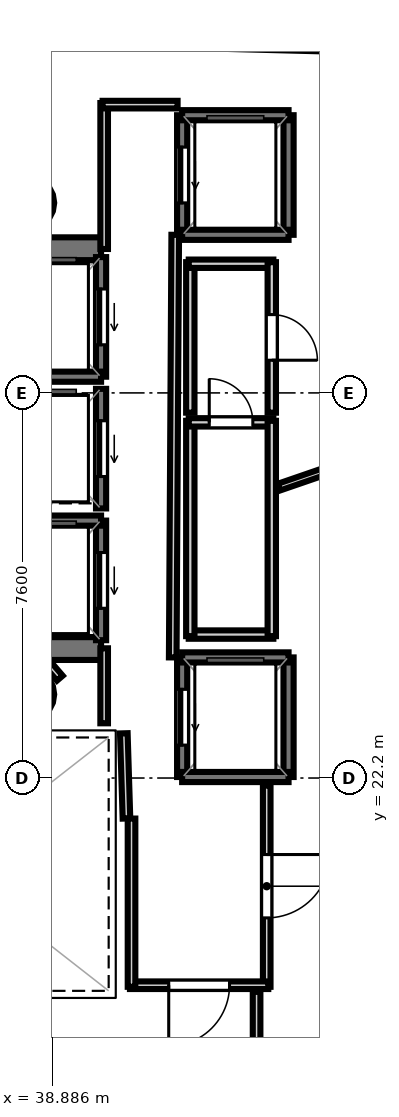
"""IFC4 building model, lengths in metres.
Left out: names, types, materials, properties, quantities, classifications, styles, units other than length and angle.
Written with IfcOpenShell. Run it as: python <this file> out.ifc"""

import sys

from ifc_helpers import new_model, si_unit, direction, frame, frame_2d, origin, origin_2d, place, context, subcontext, project, spatial, rectangle, hollow_circle, extrude, element, fill, save


model = new_model("IFC4")
c1 = context("Model", 3, precision=1e-05, world=origin(), true_north=direction((0.0, 1.0)))
c2 = subcontext(c1, "Body", "Model", "MODEL_VIEW")
j1 = project(units=[si_unit("LENGTHUNIT", "METRE"), si_unit("PLANEANGLEUNIT", "RADIAN")], contexts=[c1])
p1 = place(None, origin())
s1 = spatial("IfcSite", under=j1, at=p1, CompositionType="ELEMENT")
p2 = place(p1, origin())
s2 = spatial("IfcBuilding", under=s1, at=p2, CompositionType="ELEMENT")
p3 = place(p2, frame((0.0, 0.0, 246.4)))
s3 = spatial("IfcBuildingStorey", under=s2, at=p3, CompositionType="ELEMENT", Elevation=246.4)
p4 = place(p3, frame((29.33, 32.645, 0.0), z_axis=(0.0, 0.0, 1.0), x_axis=(1.0, 0.0, 0.0)))
e1 = element("IfcWall", 1, at=p4, inside=s3, PredefinedType="SHEAR", context=c2, shape_type="SweptSolid", body=[
    extrude(rectangle(XDim=10.52, YDim=0.45, at=frame_2d((5.26, 0.0))), origin(), (0.0, 0.0, 1.0), 3.52),
])
p5 = place(p4, frame((0.895, 0.0, 0.0)))
e2 = element("IfcOpeningElement", 2, at=p5, cuts=e1, PredefinedType="OPENING", context=c2, shape_type="SweptSolid", body=[
    extrude(rectangle(XDim=1.25, YDim=2.15, at=frame_2d((0.625, 1.075))), frame((0.0, 0.235, 0.0), z_axis=(0.0, -1.0, 0.0), x_axis=(1.0, 0.0, 0.0)), (0.0, 0.0, 1.0), 0.47),
])
p6 = place(p3, frame((29.33, 24.755, 0.0), z_axis=(0.0, 0.0, 1.0), x_axis=(1.0, 0.0, 0.0)))
e3 = element("IfcWall", 3, at=p6, inside=s3, PredefinedType="SHEAR", context=c2, shape_type="SweptSolid", body=[
    extrude(rectangle(XDim=10.52, YDim=0.45, at=frame_2d((5.26, 0.0))), origin(), (0.0, 0.0, 1.0), 3.52),
])
p7 = place(p6, frame((0.695, 0.0, 0.0)))
e4 = element("IfcOpeningElement", 4, at=p7, cuts=e3, PredefinedType="OPENING", context=c2, shape_type="SweptSolid", body=[
    extrude(rectangle(XDim=1.25, YDim=2.15, at=frame_2d((0.625, 1.075))), frame((0.0, 0.235, 0.0), z_axis=(0.0, -1.0, 0.0), x_axis=(1.0, 0.0, 0.0)), (0.0, 0.0, 1.0), 0.47),
])
for number, where, z_axis, x_axis in (
    (5, (38.4, 33.55, 0.0), (0.0, 0.0, 1.0), (1.0, 0.0, 0.0)),
    (6, (38.4, 23.85, 0.0), (0.0, 0.0, 1.0), (1.0, 0.0, 0.0)),
):
    element("IfcColumn", number, at=place(p3, frame(where, z_axis=z_axis, x_axis=x_axis)), inside=s3, PredefinedType="COLUMN", context=c2, shape_type="SweptSolid", body=[
        extrude(hollow_circle(Radius=0.525, WallThickness=0.028, at=origin_2d()), origin(), (0.0, 0.0, 1.0), 3.7),
    ])
p8 = place(p3, frame((39.85, 30.12, 0.0), z_axis=(0.0, 0.0, 1.0), x_axis=(0.0, 1.0, 0.0)))
e7 = element("IfcWall", 7, at=p8, inside=s3, PredefinedType="SOLIDWALL", context=c2, shape_type="SweptSolid", body=[
    extrude(rectangle(XDim=2.36, YDim=0.2, at=frame_2d((1.18, 0.0))), origin(), (0.0, 0.0, 1.0), 3.52),
])
p9 = place(p8, frame((0.63, 0.0, 0.0)))
e8 = element("IfcOpeningElement", 8, at=p9, cuts=e7, PredefinedType="OPENING", context=c2, shape_type="SweptSolid", body=[
    extrude(rectangle(XDim=1.1, YDim=2.15, at=frame_2d((0.55, 1.075))), frame((0.0, 0.11, 0.0), z_axis=(0.0, -1.0, 0.0), x_axis=(1.0, 0.0, 0.0)), (0.0, 0.0, 1.0), 0.22),
])
p10 = place(p3, frame((37.75, 30.12, 0.0), z_axis=(0.0, 0.0, 1.0), x_axis=(1.0, 0.0, 0.0)))
e9 = element("IfcWall", 9, at=p10, inside=s3, PredefinedType="SOLIDWALL", context=c2, shape_type="SweptSolid", body=[
    extrude(rectangle(XDim=2.1, YDim=0.2, at=frame_2d((1.05, 0.0))), origin(), (0.0, 0.0, 1.0), 3.52),
])
p11 = place(p3, frame((39.85, 24.92, 0.0), z_axis=(0.0, 0.0, 1.0), x_axis=(0.0, 1.0, 0.0)))
e10 = element("IfcWall", 10, at=p11, inside=s3, PredefinedType="SOLIDWALL", context=c2, shape_type="SweptSolid", body=[
    extrude(rectangle(XDim=2.36, YDim=0.2, at=frame_2d((1.18, 0.0))), origin(), (0.0, 0.0, 1.0), 3.52),
])
p12 = place(p11, frame((0.63, 0.0, 0.0)))
e11 = element("IfcOpeningElement", 11, at=p12, cuts=e10, PredefinedType="OPENING", context=c2, shape_type="SweptSolid", body=[
    extrude(rectangle(XDim=1.1, YDim=2.15, at=frame_2d((0.55, 1.075))), frame((0.0, 0.11, 0.0), z_axis=(0.0, -1.0, 0.0), x_axis=(1.0, 0.0, 0.0)), (0.0, 0.0, 1.0), 0.22),
])
p13 = place(p3, frame((37.75, 27.28, 0.0), z_axis=(0.0, 0.0, 1.0), x_axis=(1.0, 0.0, 0.0)))
e12 = element("IfcWall", 12, at=p13, inside=s3, PredefinedType="SOLIDWALL", context=c2, shape_type="SweptSolid", body=[
    extrude(rectangle(XDim=2.1, YDim=0.2, at=frame_2d((1.05, 0.0))), origin(), (0.0, 0.0, 1.0), 3.52),
])
p14 = place(p3, frame((39.85, 27.52, 0.0), z_axis=(0.0, 0.0, 1.0), x_axis=(0.0, 1.0, 0.0)))
e13 = element("IfcWall", 13, at=p14, inside=s3, PredefinedType="SOLIDWALL", context=c2, shape_type="SweptSolid", body=[
    extrude(rectangle(XDim=2.36, YDim=0.2, at=frame_2d((1.18, 0.0))), origin(), (0.0, 0.0, 1.0), 3.52),
])
p15 = place(p14, frame((0.63, 0.0, 0.0)))
e14 = element("IfcOpeningElement", 14, at=p15, cuts=e13, PredefinedType="OPENING", context=c2, shape_type="SweptSolid", body=[
    extrude(rectangle(XDim=1.1, YDim=2.15, at=frame_2d((0.55, 1.075))), frame((0.0, 0.11, 0.0), z_axis=(0.0, -1.0, 0.0), x_axis=(1.0, 0.0, 0.0)), (0.0, 0.0, 1.0), 0.22),
])
p16 = place(p3, frame((43.55, 22.22, 0.0), z_axis=(0.0, 0.0, 1.0), x_axis=(0.0, 1.0, 0.0)))
e15 = element("IfcWall", 15, at=p16, inside=s3, PredefinedType="SOLIDWALL", context=c2, shape_type="SweptSolid", body=[
    extrude(rectangle(XDim=2.36, YDim=0.2, at=frame_2d((1.18, 0.0))), origin(), (0.0, 0.0, 1.0), 3.52),
])
p17 = place(p3, frame((41.45, 22.22, 0.0), z_axis=(0.0, 0.0, 1.0), x_axis=(0.0, 1.0, 0.0)))
e16 = element("IfcWall", 16, at=p17, inside=s3, PredefinedType="SOLIDWALL", context=c2, shape_type="SweptSolid", body=[
    extrude(rectangle(XDim=2.36, YDim=0.2, at=frame_2d((1.18, 0.0))), origin(), (0.0, 0.0, 1.0), 3.52),
])
p18 = place(p17, frame((0.63, 0.0, 0.0)))
e17 = element("IfcOpeningElement", 17, at=p18, cuts=e16, PredefinedType="OPENING", context=c2, shape_type="SweptSolid", body=[
    extrude(rectangle(XDim=1.1, YDim=2.15, at=frame_2d((0.55, 1.075))), frame((0.0, 0.11, 0.0), z_axis=(0.0, -1.0, 0.0), x_axis=(1.0, 0.0, 0.0)), (0.0, 0.0, 1.0), 0.22),
])
for number, where, z_axis, x_axis in (
    (18, (41.45, 24.58, 0.0), (0.0, 0.0, 1.0), (1.0, 0.0, 0.0)),
    (19, (41.45, 22.22, 0.0), (0.0, 0.0, 1.0), (1.0, 0.0, 0.0)),
):
    element("IfcWall", number, at=place(p3, frame(where, z_axis=z_axis, x_axis=x_axis)), inside=s3, PredefinedType="SOLIDWALL", context=c2, shape_type="SweptSolid", body=[
        extrude(rectangle(XDim=2.1, YDim=0.2, at=frame_2d((1.05, 0.0))), origin(), (0.0, 0.0, 1.0), 3.52),
    ])
p19 = place(p3, frame((43.55, 32.92, 0.0), z_axis=(0.0, 0.0, 1.0), x_axis=(0.0, 1.0, 0.0)))
e20 = element("IfcWall", 20, at=p19, inside=s3, PredefinedType="SOLIDWALL", context=c2, shape_type="SweptSolid", body=[
    extrude(rectangle(XDim=2.36, YDim=0.2, at=frame_2d((1.18, 0.0))), origin(), (0.0, 0.0, 1.0), 3.52),
])
p20 = place(p3, frame((41.45, 32.92, 0.0), z_axis=(0.0, 0.0, 1.0), x_axis=(0.0, 1.0, 0.0)))
e21 = element("IfcWall", 21, at=p20, inside=s3, PredefinedType="SOLIDWALL", context=c2, shape_type="SweptSolid", body=[
    extrude(rectangle(XDim=2.36, YDim=0.2, at=frame_2d((1.18, 0.0))), origin(), (0.0, 0.0, 1.0), 3.52),
])
p21 = place(p20, frame((0.63, 0.0, 0.0)))
e22 = element("IfcOpeningElement", 22, at=p21, cuts=e21, PredefinedType="OPENING", context=c2, shape_type="SweptSolid", body=[
    extrude(rectangle(XDim=1.1, YDim=2.15, at=frame_2d((0.55, 1.075))), frame((0.0, 0.11, 0.0), z_axis=(0.0, -1.0, 0.0), x_axis=(1.0, 0.0, 0.0)), (0.0, 0.0, 1.0), 0.22),
])
for number, where, z_axis, x_axis in (
    (23, (41.45, 35.28, 0.0), (0.0, 0.0, 1.0), (1.0, 0.0, 0.0)),
    (24, (41.45, 32.92, 0.0), (0.0, 0.0, 1.0), (1.0, 0.0, 0.0)),
):
    element("IfcWall", number, at=place(p3, frame(where, z_axis=z_axis, x_axis=x_axis)), inside=s3, PredefinedType="SOLIDWALL", context=c2, shape_type="SweptSolid", body=[
        extrude(rectangle(XDim=2.1, YDim=0.2, at=frame_2d((1.05, 0.0))), origin(), (0.0, 0.0, 1.0), 3.52),
    ])
p22 = place(p3, frame((40.351, 21.401, 0.0), z_axis=(0.0, 0.0, 1.0), x_axis=(-0.031058045979, 0.999517582527, 0.0)))
e25 = element("IfcWall", 25, at=p22, inside=s3, PredefinedType="PARTITIONING", context=c2, shape_type="SweptSolid", body=[
    extrude(rectangle(XDim=1.682, YDim=0.15, at=frame_2d((0.841, 0.0))), origin(), (0.0, 0.0, 1.0), 2.84),
])
p23 = place(p3, frame((39.911, 23.28, 0.0), z_axis=(0.0, 0.0, 1.0), x_axis=(0.0, 1.0, 0.0)))
e26 = element("IfcWall", 26, at=p23, inside=s3, PredefinedType="PARTITIONING", context=c2, shape_type="SweptSolid", body=[
    extrude(rectangle(XDim=1.48, YDim=0.15, at=frame_2d((0.74, 0.0))), origin(), (0.0, 0.0, 1.0), 2.84),
])
p24 = place(p3, frame((39.911, 32.64, 0.0), z_axis=(0.0, 0.0, 1.0), x_axis=(0.0, 1.0, 0.0)))
e27 = element("IfcWall", 27, at=p24, inside=s3, PredefinedType="PARTITIONING", context=c2, shape_type="SweptSolid", body=[
    extrude(rectangle(XDim=2.88, YDim=0.15, at=frame_2d((1.44, 0.0))), origin(), (0.0, 0.0, 1.0), 2.84),
])
p25 = place(p3, frame((39.88, 35.489, 0.0), z_axis=(0.0, 0.0, 1.0), x_axis=(1.0, 0.0, 0.0)))
e28 = element("IfcWall", 28, at=p25, inside=s3, PredefinedType="PARTITIONING", context=c2, shape_type="SweptSolid", body=[
    extrude(rectangle(XDim=1.48, YDim=0.15, at=frame_2d((0.74, 0.0))), origin(), (0.0, 0.0, 1.0), 2.84),
])
p26 = place(p3, frame((41.313, 32.92, 0.0), z_axis=(0.0, 0.0, 1.0), x_axis=(-0.005942518022, -0.999982343084, 0.0)))
e29 = element("IfcWall", 29, at=p26, inside=s3, PredefinedType="PARTITIONING", context=c2, shape_type="SweptSolid", body=[
    extrude(rectangle(XDim=8.34, YDim=0.15, at=frame_2d((4.17, 0.0))), origin(), (0.0, 0.0, 1.0), 2.84),
])
p27 = place(p3, frame((43.119, 22.05, 0.0), z_axis=(0.0, 0.0, 1.0), x_axis=(0.0, -1.0, 0.0)))
e30 = element("IfcWall", 30, at=p27, inside=s3, PredefinedType="PARTITIONING", context=c2, shape_type="SweptSolid", body=[
    extrude(rectangle(XDim=3.97, YDim=0.15, at=frame_2d((1.985, 0.0))), origin(), (0.0, 0.0, 1.0), 2.84),
])
p28 = place(p27, frame((1.36, 0.0, 0.0)))
e31 = element("IfcOpeningElement", 31, at=p28, cuts=e30, PredefinedType="OPENING", context=c2, shape_type="SweptSolid", body=[
    extrude(rectangle(XDim=1.25, YDim=2.2, at=frame_2d((0.625, 1.1))), frame((0.0, 0.085, 0.0), z_axis=(0.0, -1.0, 0.0), x_axis=(1.0, 0.0, 0.0)), (0.0, 0.0, 1.0), 0.17),
])
p29 = place(p3, frame((43.15, 18.111, 0.0), z_axis=(0.0, 0.0, 1.0), x_axis=(-1.0, 0.0, 0.0)))
e32 = element("IfcWall", 32, at=p29, inside=s3, PredefinedType="PARTITIONING", context=c2, shape_type="SweptSolid", body=[
    extrude(rectangle(XDim=2.73, YDim=0.15, at=frame_2d((1.365, 0.0))), origin(), (0.0, 0.0, 1.0), 2.84),
])
p30 = place(p29, frame((0.765, 0.0, 0.0)))
e33 = element("IfcOpeningElement", 33, at=p30, cuts=e32, PredefinedType="OPENING", context=c2, shape_type="SweptSolid", body=[
    extrude(rectangle(XDim=1.2, YDim=2.15, at=frame_2d((0.6, 1.075))), frame((0.0, 0.085, 0.0), z_axis=(0.0, -1.0, 0.0), x_axis=(1.0, 0.0, 0.0)), (0.0, 0.0, 1.0), 0.17),
])
p31 = place(p3, frame((40.451, 18.08, 0.0), z_axis=(0.0, 0.0, 1.0), x_axis=(0.0, 1.0, 0.0)))
e34 = element("IfcWall", 34, at=p31, inside=s3, PredefinedType="PARTITIONING", context=c2, shape_type="SweptSolid", body=[
    extrude(rectangle(XDim=3.32, YDim=0.15, at=frame_2d((1.66, 0.0))), origin(), (0.0, 0.0, 1.0), 2.84),
])
p32 = place(p3, frame((43.25, 25.031, 0.0), z_axis=(0.0, 0.0, 1.0), x_axis=(-1.0, 0.0, 0.0)))
e35 = element("IfcWall", 35, at=p32, inside=s3, PredefinedType="PLUMBINGWALL", context=c2, shape_type="SweptSolid", body=[
    extrude(rectangle(XDim=1.67, YDim=0.165, at=frame_2d((0.835, 0.0))), origin(), (0.0, 0.0, 1.0), 2.84),
])
p33 = place(p3, frame((41.611, 25.0, 0.0), z_axis=(0.0, 0.0, 1.0), x_axis=(0.0, 1.0, 0.0)))
e36 = element("IfcWall", 36, at=p33, inside=s3, PredefinedType="PLUMBINGWALL", context=c2, shape_type="SweptSolid", body=[
    extrude(rectangle(XDim=4.25, YDim=0.165, at=frame_2d((2.125, 0.0))), origin(), (0.0, 0.0, 1.0), 2.84),
])
p34 = place(p3, frame((41.58, 29.219, 0.0), z_axis=(0.0, 0.0, 1.0), x_axis=(1.0, 0.0, 0.0)))
e37 = element("IfcWall", 37, at=p34, inside=s3, PredefinedType="PLUMBINGWALL", context=c2, shape_type="SweptSolid", body=[
    extrude(rectangle(XDim=1.67, YDim=0.165, at=frame_2d((0.835, 0.0))), origin(), (0.0, 0.0, 1.0), 2.84),
])
p35 = place(p34, frame((0.405, 0.0, 0.0)))
e38 = element("IfcOpeningElement", 38, at=p35, cuts=e37, PredefinedType="OPENING", context=c2, shape_type="SweptSolid", body=[
    extrude(rectangle(XDim=0.86, YDim=2.05, at=frame_2d((0.43, 1.025))), frame((0.0, 0.093, 0.0), z_axis=(0.0, -1.0, 0.0), x_axis=(1.0, 0.0, 0.0)), (0.0, 0.0, 1.0), 0.185),
])
p36 = place(p3, frame((43.219, 29.25, 0.0), z_axis=(0.0, 0.0, 1.0), x_axis=(0.0, -1.0, 0.0)))
e39 = element("IfcWall", 39, at=p36, inside=s3, PredefinedType="PLUMBINGWALL", context=c2, shape_type="SweptSolid", body=[
    extrude(rectangle(XDim=4.25, YDim=0.165, at=frame_2d((2.125, 0.0))), origin(), (0.0, 0.0, 1.0), 2.84),
])
p37 = place(p3, frame((41.611, 29.41, 0.0), z_axis=(0.0, 0.0, 1.0), x_axis=(0.0, 1.0, 0.0)))
e40 = element("IfcWall", 40, at=p37, inside=s3, PredefinedType="PLUMBINGWALL", context=c2, shape_type="SweptSolid", body=[
    extrude(rectangle(XDim=2.97, YDim=0.165, at=frame_2d((1.485, 0.0))), origin(), (0.0, 0.0, 1.0), 2.84),
])
p38 = place(p3, frame((41.58, 32.349, 0.0), z_axis=(0.0, 0.0, 1.0), x_axis=(1.0, 0.0, 0.0)))
e41 = element("IfcWall", 41, at=p38, inside=s3, PredefinedType="PLUMBINGWALL", context=c2, shape_type="SweptSolid", body=[
    extrude(rectangle(XDim=1.67, YDim=0.165, at=frame_2d((0.835, 0.0))), origin(), (0.0, 0.0, 1.0), 2.84),
])
p39 = place(p3, frame((43.219, 32.38, 0.0), z_axis=(0.0, 0.0, 1.0), x_axis=(0.0, -1.0, 0.0)))
e42 = element("IfcWall", 42, at=p39, inside=s3, PredefinedType="PLUMBINGWALL", context=c2, shape_type="SweptSolid", body=[
    extrude(rectangle(XDim=2.97, YDim=0.165, at=frame_2d((1.485, 0.0))), origin(), (0.0, 0.0, 1.0), 2.84),
])
p40 = place(p39, frame((1.035, 0.0, 0.0)))
e43 = element("IfcOpeningElement", 43, at=p40, cuts=e42, PredefinedType="OPENING", context=c2, shape_type="SweptSolid", body=[
    extrude(rectangle(XDim=0.9, YDim=2.1, at=frame_2d((0.45, 1.05))), frame((0.0, 0.093, 0.0), z_axis=(0.0, -1.0, 0.0), x_axis=(1.0, 0.0, 0.0)), (0.0, 0.0, 1.0), 0.185),
])
p41 = place(p3, frame((39.036, 24.17, 0.0), z_axis=(0.0, 0.0, 1.0), x_axis=(-0.652260263346, 0.757995084984, 0.0)))
e44 = element("IfcWall", 44, at=p41, inside=s3, PredefinedType="PARTITIONING", context=c2, shape_type="SweptSolid", body=[
    extrude(rectangle(XDim=0.355, YDim=0.15, at=frame_2d((0.178, 0.0))), origin(), (0.0, 0.0, 1.0), 2.84),
])
p42 = place(p3, frame((42.919, 17.98, 0.0), z_axis=(0.0, 0.0, 1.0), x_axis=(0.0, -1.0, 0.0)))
e45 = element("IfcWall", 45, at=p42, inside=s3, PredefinedType="PARTITIONING", context=c2, shape_type="SweptSolid", body=[
    extrude(rectangle(XDim=2.812, YDim=0.15, at=frame_2d((1.406, 0.0))), origin(), (0.0, 0.0, 1.0), 2.84),
])
p43 = place(p3, frame((43.36, 27.941, 0.0), z_axis=(0.0, 0.0, 1.0), x_axis=(0.945522307721, 0.325557315388, 0.0)))
e46 = element("IfcWall", 46, at=p43, inside=s3, PredefinedType="PARTITIONING", context=c2, shape_type="SweptSolid", body=[
    extrude(rectangle(XDim=15.401, YDim=0.14, at=frame_2d((7.701, 0.0))), origin(), (0.0, 0.0, 1.0), 2.84),
])
p44 = place(p3, frame((22.282, 37.164, 0.0), z_axis=(0.0, 0.0, 1.0), x_axis=(0.99966963281, -0.025702630935, 0.0)))
e47 = element("IfcWall", 47, at=p44, inside=s3, PredefinedType="PARTITIONING", context=c2, shape_type="SweptSolid", body=[
    extrude(rectangle(XDim=34.661, YDim=0.12, at=frame_2d((17.33, 0.0))), origin(), (0.0, 0.0, 1.0), 2.84),
])
p45 = place(p9, origin())
e48 = element("IfcDoor", 48, at=p45, inside=s3, OperationType="SLIDING_TO_LEFT", PredefinedType="DOOR", context=c2, shape_type="SweptSolid", body=[
    extrude(rectangle(XDim=1.1, YDim=2.15, at=frame_2d((0.55, 1.075))), frame((0.0, 0.025, 0.0), z_axis=(0.0, -1.0, 0.0), x_axis=(1.0, 0.0, 0.0)), (0.0, 0.0, 1.0), 0.05),
])
fill(e8, e48)
p46 = place(p12, origin())
e49 = element("IfcDoor", 49, at=p46, inside=s3, OperationType="SLIDING_TO_LEFT", PredefinedType="DOOR", context=c2, shape_type="SweptSolid", body=[
    extrude(rectangle(XDim=1.1, YDim=2.15, at=frame_2d((0.55, 1.075))), frame((0.0, 0.025, 0.0), z_axis=(0.0, -1.0, 0.0), x_axis=(1.0, 0.0, 0.0)), (0.0, 0.0, 1.0), 0.05),
])
fill(e11, e49)
p47 = place(p15, origin())
e50 = element("IfcDoor", 50, at=p47, inside=s3, OperationType="SLIDING_TO_LEFT", PredefinedType="DOOR", context=c2, shape_type="SweptSolid", body=[
    extrude(rectangle(XDim=1.1, YDim=2.15, at=frame_2d((0.55, 1.075))), frame((0.0, 0.025, 0.0), z_axis=(0.0, -1.0, 0.0), x_axis=(1.0, 0.0, 0.0)), (0.0, 0.0, 1.0), 0.05),
])
fill(e14, e50)
p48 = place(p18, origin())
e51 = element("IfcDoor", 51, at=p48, inside=s3, OperationType="SLIDING_TO_LEFT", PredefinedType="DOOR", context=c2, shape_type="SweptSolid", body=[
    extrude(rectangle(XDim=1.1, YDim=2.15, at=frame_2d((0.55, 1.075))), frame((0.0, 0.025, 0.0), z_axis=(0.0, -1.0, 0.0), x_axis=(1.0, 0.0, 0.0)), (0.0, 0.0, 1.0), 0.05),
])
fill(e17, e51)
p49 = place(p21, origin())
e52 = element("IfcDoor", 52, at=p49, inside=s3, OperationType="SLIDING_TO_LEFT", PredefinedType="DOOR", context=c2, shape_type="SweptSolid", body=[
    extrude(rectangle(XDim=1.1, YDim=2.15, at=frame_2d((0.55, 1.075))), frame((0.0, 0.025, 0.0), z_axis=(0.0, -1.0, 0.0), x_axis=(1.0, 0.0, 0.0)), (0.0, 0.0, 1.0), 0.05),
])
fill(e22, e52)
p50 = place(p30, origin())
e53 = element("IfcDoor", 53, at=p50, inside=s3, OperationType="SINGLE_SWING_RIGHT", PredefinedType="DOOR", context=c2, shape_type="SweptSolid", body=[
    extrude(rectangle(XDim=1.2, YDim=2.15, at=frame_2d((0.6, 1.075))), frame((0.0, 0.025, 0.0), z_axis=(0.0, -1.0, 0.0), x_axis=(1.0, 0.0, 0.0)), (0.0, 0.0, 1.0), 0.05),
])
fill(e33, e53)
p51 = place(p28, origin())
e54 = element("IfcDoor", 54, at=p51, inside=s3, OperationType="SINGLE_SWING_LEFT", PredefinedType="DOOR", context=c2, shape_type="SweptSolid", body=[
    extrude(rectangle(XDim=1.25, YDim=2.2, at=frame_2d((0.625, 1.1))), frame((0.0, 0.025, 0.0), z_axis=(0.0, -1.0, 0.0), x_axis=(1.0, 0.0, 0.0)), (0.0, 0.0, 1.0), 0.05),
])
fill(e31, e54)
p52 = place(p40, origin())
e55 = element("IfcDoor", 55, at=p52, inside=s3, OperationType="SINGLE_SWING_RIGHT", PredefinedType="DOOR", context=c2, shape_type="SweptSolid", body=[
    extrude(rectangle(XDim=0.9, YDim=2.1, at=frame_2d((0.45, 1.05))), frame((0.0, 0.025, 0.0), z_axis=(0.0, -1.0, 0.0), x_axis=(1.0, 0.0, 0.0)), (0.0, 0.0, 1.0), 0.05),
])
fill(e43, e55)
p53 = place(p35, origin())
e56 = element("IfcDoor", 56, at=p53, inside=s3, OperationType="SINGLE_SWING_LEFT", PredefinedType="DOOR", context=c2, shape_type="SweptSolid", body=[
    extrude(rectangle(XDim=0.86, YDim=2.05, at=frame_2d((0.43, 1.025))), frame((0.0, 0.025, 0.0), z_axis=(0.0, -1.0, 0.0), x_axis=(1.0, 0.0, 0.0)), (0.0, 0.0, 1.0), 0.05),
])
fill(e38, e56)
save(model, sys.argv[1])
